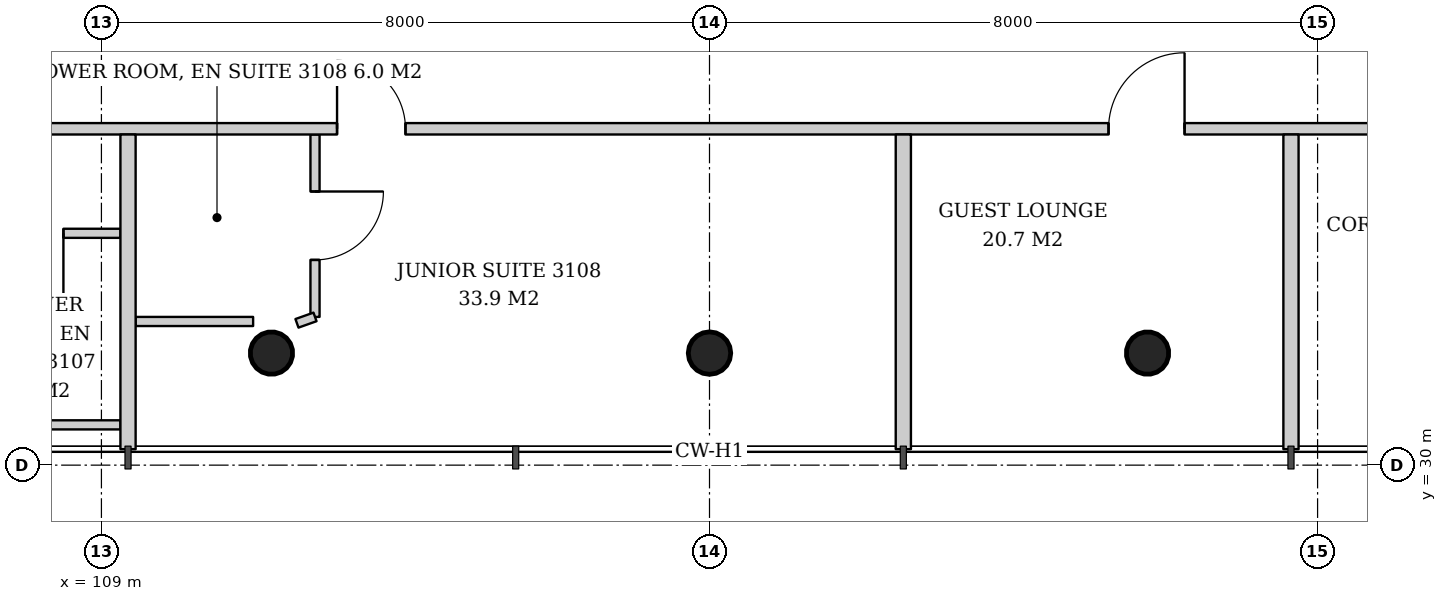
"""IFC4 building model, lengths in metres.
Left out: names, types, materials, properties, quantities, classifications, styles, units other than length and angle.
Written with IfcOpenShell. Run it as: python <this file> out.ifc"""

import sys

from ifc_helpers import new_model, si_unit, direction, frame, frame_2d, origin, origin_2d, place, context, subcontext, project, spatial, rectangle, hollow_circle, extrude, element, fill, save


model = new_model("IFC4")
c1 = context("Model", 3, precision=1e-05, world=origin(), true_north=direction((0.0, 1.0)))
c2 = subcontext(c1, "Body", "Model", "MODEL_VIEW")
j1 = project(units=[si_unit("LENGTHUNIT", "METRE"), si_unit("PLANEANGLEUNIT", "RADIAN")], contexts=[c1])
p1 = place(None, origin())
s1 = spatial("IfcSite", under=j1, at=p1, CompositionType="ELEMENT")
p2 = place(p1, origin())
s2 = spatial("IfcBuilding", under=s1, at=p2, CompositionType="ELEMENT")
p3 = place(p2, frame((0.0, 0.0, 123.6)))
s3 = spatial("IfcBuildingStorey", under=s2, at=p3, CompositionType="ELEMENT", Elevation=123.6)
p4 = place(p3, frame((111.211, 31.422, 0.0), z_axis=(0.021563230905, 0.043062285527, 0.998839660125), x_axis=(-0.894160516368, 0.44774654769, 0.0)))
e1 = element("IfcColumn", 1, at=p4, inside=s3, PredefinedType="COLUMN", context=c2, shape_type="SweptSolid", body=[
    extrude(hollow_circle(Radius=0.28, WallThickness=0.02, at=origin_2d()), origin(), (0.0, 0.0, 1.0), 3.804),
])
p5 = place(p3, frame((117.0, 31.422, 0.0), z_axis=(0.0, 0.043072300418, 0.999071957837), x_axis=(-1.0, 0.0, 0.0)))
e2 = element("IfcColumn", 2, at=p5, inside=s3, PredefinedType="COLUMN", context=c2, shape_type="SweptSolid", body=[
    extrude(hollow_circle(Radius=0.28, WallThickness=0.02, at=origin_2d()), origin(), (0.0, 0.0, 1.0), 3.803),
])
p6 = place(p3, frame((122.789, 31.422, 0.0), z_axis=(-0.021563230905, 0.043062285527, 0.998839660125), x_axis=(-0.894160516368, -0.44774654769, 0.0)))
e3 = element("IfcColumn", 3, at=p6, inside=s3, PredefinedType="COLUMN", context=c2, shape_type="SweptSolid", body=[
    extrude(hollow_circle(Radius=0.28, WallThickness=0.02, at=origin_2d()), origin(), (0.0, 0.0, 1.0), 3.804),
])
p7 = place(p3, frame((109.25, 33.05, 0.0), z_axis=(0.0, 0.0, 1.0), x_axis=(-1.0, 0.0, 0.0)))
e4 = element("IfcWall", 4, at=p7, inside=s3, PredefinedType="PARTITIONING", context=c2, shape_type="SweptSolid", body=[
    extrude(rectangle(XDim=2.58, YDim=0.12, at=frame_2d((1.29, 0.0))), origin(), (0.0, 0.0, 1.0), 2.9),
])
p8 = place(p7, frame((0.75, 0.0, 0.0)))
e5 = element("IfcOpeningElement", 5, at=p8, cuts=e4, PredefinedType="OPENING", context=c2, shape_type="SweptSolid", body=[
    extrude(rectangle(XDim=0.9, YDim=2.1, at=frame_2d((0.45, 1.05))), frame((0.0, 0.07, 0.0), z_axis=(0.0, -1.0, 0.0), x_axis=(1.0, 0.0, 0.0)), (0.0, 0.0, 1.0), 0.14),
])
p9 = place(p3, frame((109.25, 30.53, 0.0), z_axis=(0.0, 0.0, 1.0), x_axis=(-1.0, 0.0, 0.0)))
e6 = element("IfcWall", 6, at=p9, inside=s3, PredefinedType="PARTITIONING", context=c2, shape_type="SweptSolid", body=[
    extrude(rectangle(XDim=2.58, YDim=0.12, at=frame_2d((1.29, 0.0))), origin(), (0.0, 0.0, 1.0), 3.6),
])
p10 = place(p3, frame((109.45, 31.89, 0.0), z_axis=(0.0, 0.0, 1.0), x_axis=(1.0, 0.0, 0.0)))
e7 = element("IfcWall", 7, at=p10, inside=s3, PredefinedType="PARTITIONING", context=c2, shape_type="SweptSolid", body=[
    extrude(rectangle(XDim=1.546, YDim=0.12, at=frame_2d((0.773, 0.0))), origin(), (0.0, 0.0, 1.0), 3.6),
])
p11 = place(p3, frame((111.81, 34.35, 0.0), z_axis=(0.0, 0.0, 1.0), x_axis=(0.0, -1.0, 0.0)))
e8 = element("IfcWall", 8, at=p11, inside=s3, PredefinedType="PARTITIONING", context=c2, shape_type="SweptSolid", body=[
    extrude(rectangle(XDim=2.4, YDim=0.12, at=frame_2d((1.2, 0.0))), origin(), (0.0, 0.0, 1.0), 3.0),
])
p12 = place(p11, frame((0.75, 0.0, 0.0)))
e9 = element("IfcOpeningElement", 9, at=p12, cuts=e8, PredefinedType="OPENING", context=c2, shape_type="SweptSolid", body=[
    extrude(rectangle(XDim=0.9, YDim=2.1, at=frame_2d((0.45, 1.05))), frame((0.0, 0.07, 0.0), z_axis=(0.0, -1.0, 0.0), x_axis=(1.0, 0.0, 0.0)), (0.0, 0.0, 1.0), 0.14),
])
p13 = place(p3, frame((106.207, 34.425, 0.0), z_axis=(0.0, 0.0, 1.0), x_axis=(1.0, 0.0, 0.0)))
e10 = element("IfcWall", 10, at=p13, inside=s3, PredefinedType="PARTITIONING", context=c2, shape_type="SweptSolid", body=[
    extrude(rectangle(XDim=21.586, YDim=0.15, at=frame_2d((10.793, 0.0))), origin(), (0.0, 0.0, 1.0), 2.9),
])
p14 = place(p13, frame((0.718, 0.0, 0.0)))
e11 = element("IfcOpeningElement", 11, at=p14, cuts=e10, PredefinedType="OPENING", context=c2, shape_type="SweptSolid", body=[
    extrude(rectangle(XDim=0.9, YDim=2.1, at=frame_2d((0.45, 1.05))), frame((0.0, 0.085, 0.0), z_axis=(0.0, -1.0, 0.0), x_axis=(1.0, 0.0, 0.0)), (0.0, 0.0, 1.0), 0.17),
])
p15 = place(p13, frame((5.893, 0.0, 0.0)))
e12 = element("IfcOpeningElement", 12, at=p15, cuts=e10, PredefinedType="OPENING", context=c2, shape_type="SweptSolid", body=[
    extrude(rectangle(XDim=0.9, YDim=2.1, at=frame_2d((0.45, 1.05))), frame((0.0, 0.085, 0.0), z_axis=(0.0, -1.0, 0.0), x_axis=(1.0, 0.0, 0.0)), (0.0, 0.0, 1.0), 0.17),
])
p16 = place(p13, frame((16.043, 0.0, 0.0)))
e13 = element("IfcOpeningElement", 13, at=p16, cuts=e10, PredefinedType="OPENING", context=c2, shape_type="SweptSolid", body=[
    extrude(rectangle(XDim=1.0, YDim=2.1, at=frame_2d((0.5, 1.05))), frame((0.0, 0.085, 0.0), z_axis=(0.0, -1.0, 0.0), x_axis=(1.0, 0.0, 0.0)), (0.0, 0.0, 1.0), 0.17),
])
p17 = place(p3, frame((109.35, 34.35, 0.0), z_axis=(0.0, 0.0, 1.0), x_axis=(0.0, -1.0, 0.0)))
e14 = element("IfcWall", 14, at=p17, inside=s3, PredefinedType="PARTITIONING", context=c2, shape_type="SweptSolid", body=[
    extrude(rectangle(XDim=4.14, YDim=0.2, at=frame_2d((2.07, 0.0))), origin(), (0.0, 0.0, 1.0), 3.2),
])
p18 = place(p3, frame((119.55, 34.35, 0.0), z_axis=(0.0, 0.0, 1.0), x_axis=(0.0, -1.0, 0.0)))
e15 = element("IfcWall", 15, at=p18, inside=s3, PredefinedType="PARTITIONING", context=c2, shape_type="SweptSolid", body=[
    extrude(rectangle(XDim=4.14, YDim=0.2, at=frame_2d((2.07, 0.0))), origin(), (0.0, 0.0, 1.0), 3.0),
])
p19 = place(p3, frame((124.65, 34.35, 0.0), z_axis=(0.0, 0.0, 1.0), x_axis=(0.0, -1.0, 0.0)))
e16 = element("IfcWall", 16, at=p19, inside=s3, PredefinedType="PARTITIONING", context=c2, shape_type="SweptSolid", body=[
    extrude(rectangle(XDim=4.14, YDim=0.2, at=frame_2d((2.07, 0.0))), origin(), (0.0, 0.0, 1.0), 3.2),
])
p20 = place(p3, frame((111.81, 31.95, 0.0), z_axis=(0.0, 0.0, 1.0), x_axis=(-0.942506501315, -0.33418781393, 0.0)))
e17 = element("IfcWall", 17, at=p20, inside=s3, PredefinedType="PARTITIONING", context=c2, shape_type="SweptSolid", body=[
    extrude(rectangle(XDim=0.252, YDim=0.12, at=frame_2d((0.126, 0.0))), origin(), (0.0, 0.0, 1.0), 3.0),
])
p21 = place(p8, origin())
e18 = element("IfcDoor", 18, at=p21, inside=s3, OperationType="SINGLE_SWING_LEFT", PredefinedType="DOOR", context=c2, shape_type="SweptSolid", body=[
    extrude(rectangle(XDim=0.9, YDim=2.1, at=frame_2d((0.45, 1.05))), frame((0.0, 0.025, 0.0), z_axis=(0.0, -1.0, 0.0), x_axis=(1.0, 0.0, 0.0)), (0.0, 0.0, 1.0), 0.05),
])
fill(e5, e18)
p22 = place(p12, origin())
e19 = element("IfcDoor", 19, at=p22, inside=s3, OperationType="SINGLE_SWING_LEFT", PredefinedType="DOOR", context=c2, shape_type="SweptSolid", body=[
    extrude(rectangle(XDim=0.9, YDim=2.1, at=frame_2d((0.45, 1.05))), frame((0.0, 0.025, 0.0), z_axis=(0.0, -1.0, 0.0), x_axis=(1.0, 0.0, 0.0)), (0.0, 0.0, 1.0), 0.05),
])
fill(e9, e19)
p23 = place(p15, origin())
e20 = element("IfcDoor", 20, at=p23, inside=s3, OperationType="SINGLE_SWING_LEFT", PredefinedType="DOOR", context=c2, shape_type="SweptSolid", body=[
    extrude(rectangle(XDim=0.9, YDim=2.1, at=frame_2d((0.45, 1.05))), frame((0.0, 0.025, 0.0), z_axis=(0.0, -1.0, 0.0), x_axis=(1.0, 0.0, 0.0)), (0.0, 0.0, 1.0), 0.05),
])
fill(e12, e20)
p24 = place(p16, origin())
e21 = element("IfcDoor", 21, at=p24, inside=s3, OperationType="SINGLE_SWING_RIGHT", PredefinedType="DOOR", context=c2, shape_type="SweptSolid", body=[
    extrude(rectangle(XDim=1.0, YDim=2.1, at=frame_2d((0.5, 1.05))), frame((0.0, 0.025, 0.0), z_axis=(0.0, -1.0, 0.0), x_axis=(1.0, 0.0, 0.0)), (0.0, 0.0, 1.0), 0.05),
])
fill(e13, e21)
save(model, sys.argv[1])
